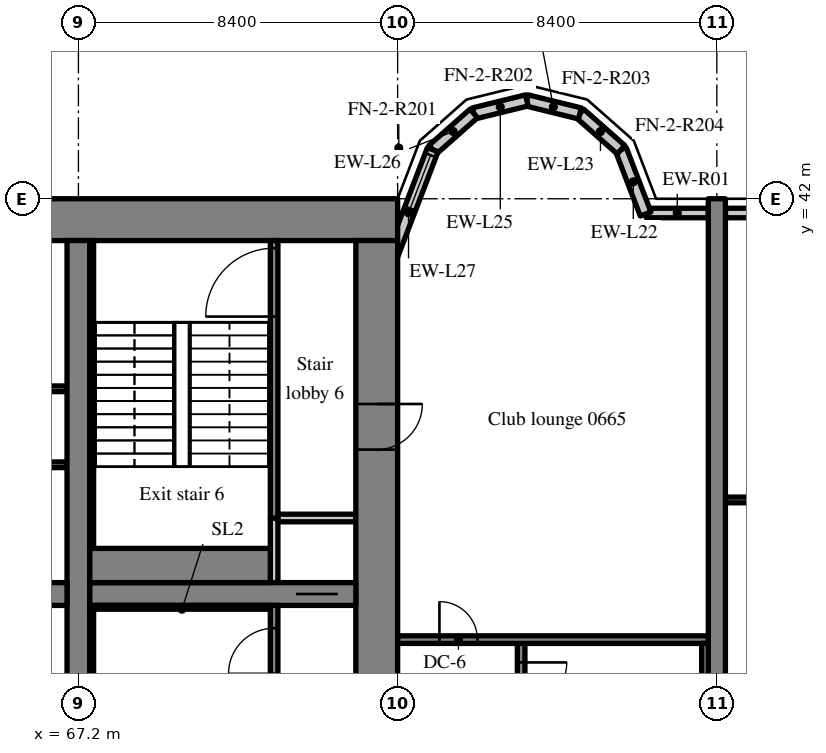
"""IFC4 building model, lengths in metres.
Left out: names, types, materials, properties, quantities, classifications, styles, units other than length and angle.
Written with IfcOpenShell. Run it as: python <this file> out.ifc"""

import sys

from ifc_helpers import new_model, si_unit, direction, frame, frame_2d, origin, place, context, subcontext, project, spatial, rectangle, extrude, source, transform, mapped, element, fill, save


model = new_model("IFC4")
c1 = context("Model", 3, precision=1e-05, world=origin(), true_north=direction((0.0, 1.0)))
c2 = subcontext(c1, "Body", "Model", "MODEL_VIEW")
j1 = project(units=[si_unit("LENGTHUNIT", "METRE"), si_unit("PLANEANGLEUNIT", "RADIAN")], contexts=[c1])
p1 = place(None, origin())
s1 = spatial("IfcSite", under=j1, at=p1, CompositionType="ELEMENT")
p2 = place(p1, origin())
s2 = spatial("IfcBuilding", under=s1, at=p2, CompositionType="ELEMENT")
p3 = place(p2, frame((0.0, 0.0, 31.6)))
s3 = spatial("IfcBuildingStorey", under=s2, at=p3, CompositionType="ELEMENT", Elevation=31.6)
m1 = source(origin(), c2, "Body", "SweptSolid", [
    extrude(rectangle(XDim=50.4, YDim=1.1, at=frame_2d((25.2, 0.0))), origin(), (0.0, 0.0, 1.0), 3.52),
])
p4 = place(p3, frame((25.2, 41.45, 0.0), z_axis=(0.0, 0.0, 1.0), x_axis=(1.0, 0.0, 0.0)))
e1 = element("IfcWall", 1, at=p4, inside=s3, PredefinedType="SHEAR", context=c2, shape_type="MappedRepresentation", body=[
    mapped(m1, transform((0.0, 0.0, 0.0), scale=1.0)),
])
m2 = source(origin(), c2, "Body", "SweptSolid", [
    extrude(rectangle(XDim=17.8, YDim=1.1, at=frame_2d((8.9, 0.0))), origin(), (0.0, 0.0, 1.0), 3.52),
])
p5 = place(p3, frame((75.05, 23.1, 0.0), z_axis=(0.0, 0.0, 1.0), x_axis=(0.0, 1.0, 0.0)))
e2 = element("IfcWall", 2, at=p5, inside=s3, PredefinedType="SHEAR", context=c2, shape_type="MappedRepresentation", body=[
    mapped(m2, transform((0.0, 0.0, 0.0), scale=1.0)),
])
m3 = source(origin(), c2, "Body", "SweptSolid", [
    extrude(rectangle(XDim=1.2, YDim=2.1, at=frame_2d((0.6, 1.05))), frame((0.0, 0.56, 0.0), z_axis=(0.0, -1.0, 0.0), x_axis=(1.0, 0.0, 0.0)), (0.0, 0.0, 1.0), 1.12),
])
p6 = place(p5, frame((12.3, 0.0, 0.0)))
e3 = element("IfcOpeningElement", 3, at=p6, cuts=e2, PredefinedType="OPENING", context=c2, shape_type="MappedRepresentation", body=[
    mapped(m3, transform((0.0, 0.0, 0.0), scale=1.0)),
])
m4 = source(origin(), c2, "Body", "SweptSolid", [
    extrude(rectangle(XDim=17.8, YDim=0.6, at=frame_2d((8.9, 0.0))), origin(), (0.0, 0.0, 1.0), 3.52),
])
p7 = place(p3, frame((67.2, 23.1, 0.0), z_axis=(0.0, 0.0, 1.0), x_axis=(0.0, 1.0, 0.0)))
e4 = element("IfcWall", 4, at=p7, inside=s3, PredefinedType="SHEAR", context=c2, shape_type="MappedRepresentation", body=[
    mapped(m4, transform((0.0, 0.0, 0.0), scale=1.0)),
])
m5 = source(origin(), c2, "Body", "SweptSolid", [
    extrude(rectangle(XDim=16.2, YDim=0.6, at=frame_2d((8.1, 0.0))), origin(), (0.0, 0.0, 1.0), 3.52),
])
p8 = place(p3, frame((50.7, 31.6, 0.0), z_axis=(0.0, 0.0, 1.0), x_axis=(1.0, 0.0, 0.0)))
e5 = element("IfcWall", 5, at=p8, inside=s3, PredefinedType="SHEAR", context=c2, shape_type="MappedRepresentation", body=[
    mapped(m5, transform((0.0, 0.0, 0.0), scale=1.0)),
])
m6 = source(origin(), c2, "Body", "SweptSolid", [
    extrude(rectangle(XDim=1.0, YDim=2.1, at=frame_2d((0.5, 1.05))), frame((0.0, 0.31, 0.0), z_axis=(0.0, -1.0, 0.0), x_axis=(1.0, 0.0, 0.0)), (0.0, 0.0, 1.0), 0.62),
])
p9 = place(p8, frame((0.55, 0.0, 0.0)))
e6 = element("IfcOpeningElement", 6, at=p9, cuts=e5, PredefinedType="OPENING", context=c2, shape_type="MappedRepresentation", body=[
    mapped(m6, transform((0.0, 0.0, 0.0), scale=1.0)),
])
m7 = source(origin(), c2, "Body", "SweptSolid", [
    extrude(rectangle(XDim=7.0, YDim=0.6, at=frame_2d((3.5, 0.0))), origin(), (0.0, 0.0, 1.0), 3.52),
])
p10 = place(p3, frame((67.5, 31.6, 0.0), z_axis=(0.0, 0.0, 1.0), x_axis=(1.0, 0.0, 0.0)))
e7 = element("IfcWall", 7, at=p10, inside=s3, PredefinedType="SHEAR", context=c2, shape_type="MappedRepresentation", body=[
    mapped(m7, transform((0.0, 0.0, 0.0), scale=1.0)),
])
m8 = source(origin(), c2, "Body", "SweptSolid", [
    extrude(rectangle(XDim=1.1, YDim=2.1, at=frame_2d((0.55, 1.05))), frame((0.0, 0.31, 0.0), z_axis=(0.0, -1.0, 0.0), x_axis=(1.0, 0.0, 0.0)), (0.0, 0.0, 1.0), 0.62),
])
p11 = place(p10, frame((5.425, 0.0, 0.0)))
e8 = element("IfcOpeningElement", 8, at=p11, cuts=e7, PredefinedType="OPENING", context=c2, shape_type="MappedRepresentation", body=[
    mapped(m8, transform((0.0, 0.0, 0.0), scale=1.0)),
])
m9 = source(origin(), c2, "Body", "SweptSolid", [
    extrude(rectangle(XDim=20.0, YDim=0.45, at=frame_2d((10.0, 0.0))), origin(), (0.0, 0.0, 1.0), 3.52),
])
p12 = place(p3, frame((84.0, 22.0, 0.0), z_axis=(0.0, 0.0, 1.0), x_axis=(0.0, 1.0, 0.0)))
e9 = element("IfcWall", 9, at=p12, inside=s3, PredefinedType="SHEAR", context=c2, shape_type="MappedRepresentation", body=[
    mapped(m9, transform((0.0, 0.0, 0.0), scale=1.0)),
])
m10 = source(origin(), c2, "Body", "SweptSolid", [
    extrude(rectangle(XDim=1.633, YDim=0.25, at=frame_2d((0.816, 0.0))), origin(), (0.0, 0.0, 1.0), 2.77),
])
p13 = place(p3, frame((83.775, 41.625, 0.0), z_axis=(0.0, 0.0, 1.0), x_axis=(-1.0, 0.0, 0.0)))
e10 = element("IfcWall", 10, at=p13, inside=s3, PredefinedType="SOLIDWALL", context=c2, shape_type="MappedRepresentation", body=[
    mapped(m10, transform((0.0, 0.0, 0.0), scale=1.0)),
])
m11 = source(origin(), c2, "Body", "SweptSolid", [
    extrude(rectangle(XDim=3.525, YDim=0.25, at=frame_2d((1.762, 0.0))), origin(), (0.0, 0.0, 1.0), 2.77),
])
p14 = place(p3, frame((87.75, 41.625, 0.0), z_axis=(0.0, 0.0, 1.0), x_axis=(-1.0, 0.0, 0.0)))
e11 = element("IfcWall", 11, at=p14, inside=s3, PredefinedType="SOLIDWALL", context=c2, shape_type="MappedRepresentation", body=[
    mapped(m11, transform((0.0, 0.0, 0.0), scale=1.0)),
])
m12 = source(origin(), c2, "Body", "SweptSolid", [
    extrude(rectangle(XDim=1.5, YDim=1.5, at=frame_2d((0.75, 0.75))), frame((0.0, 0.135, 0.0), z_axis=(0.0, -1.0, 0.0), x_axis=(1.0, 0.0, 0.0)), (0.0, 0.0, 1.0), 0.27),
])
p15 = place(p14, frame((1.012, 0.0, 0.9)))
e12 = element("IfcOpeningElement", 12, at=p15, cuts=e11, PredefinedType="OPENING", context=c2, shape_type="MappedRepresentation", body=[
    mapped(m12, transform((0.0, 0.0, 0.0), scale=1.0)),
])
m13 = source(origin(), c2, "Body", "SweptSolid", [
    extrude(rectangle(XDim=1.812, YDim=0.3, at=frame_2d((0.906, 0.0))), origin(), (0.0, 0.0, 1.0), 3.52),
])
p16 = place(p3, frame((82.125, 41.6, 0.0), z_axis=(0.0, 0.0, 1.0), x_axis=(-0.357877270961, 0.93376863244, 0.0)))
e13 = element("IfcWall", 13, at=p16, inside=s3, PredefinedType="SOLIDWALL", context=c2, shape_type="MappedRepresentation", body=[
    mapped(m13, transform((0.0, 0.0, 0.0), scale=1.0)),
])
m14 = source(origin(), c2, "Body", "SweptSolid", [
    extrude(rectangle(XDim=1.44, YDim=0.3, at=frame_2d((0.72, 0.0))), origin(), (0.0, 0.0, 1.0), 3.52),
])
p17 = place(p3, frame((81.477, 43.292, 0.0), z_axis=(0.0, 0.0, 1.0), x_axis=(-0.74957555648, 0.661918790432, 0.0)))
e14 = element("IfcWall", 14, at=p17, inside=s3, PredefinedType="SOLIDWALL", context=c2, shape_type="MappedRepresentation", body=[
    mapped(m14, transform((0.0, 0.0, 0.0), scale=1.0)),
])
m15 = source(origin(), c2, "Body", "SweptSolid", [
    extrude(rectangle(XDim=1.439, YDim=0.3, at=frame_2d((0.719, 0.0))), origin(), (0.0, 0.0, 1.0), 3.52),
])
for number, where, z_axis, x_axis in (
    (15, (80.397, 44.245, 0.0), (0.0, 0.0, 1.0), (-0.971, 0.238, 0.0)),
    (16, (79.0, 44.588, 0.0), (0.0, 0.0, 1.0), (-0.971, -0.238, 0.0)),
):
    element("IfcWall", number, at=place(p3, frame(where, z_axis=z_axis, x_axis=x_axis)), inside=s3, PredefinedType="SOLIDWALL", context=c2, shape_type="MappedRepresentation", body=[
        mapped(m15, transform((0.0, 0.0, 0.0), scale=1.0)),
    ])
p18 = place(p3, frame((77.603, 44.245, 0.0), z_axis=(0.0, 0.0, 1.0), x_axis=(-0.74957555648, -0.661918790432, 0.0)))
e17 = element("IfcWall", 17, at=p18, inside=s3, PredefinedType="SOLIDWALL", context=c2, shape_type="MappedRepresentation", body=[
    mapped(m14, transform((0.0, 0.0, 0.0), scale=1.0)),
])
m16 = source(origin(), c2, "Body", "SweptSolid", [
    extrude(rectangle(XDim=3.559, YDim=0.3, at=frame_2d((1.78, 0.0))), origin(), (0.0, 0.0, 1.0), 3.52),
])
p19 = place(p3, frame((76.523, 43.292, 0.0), z_axis=(0.0, 0.0, 1.0), x_axis=(-0.35779745313, -0.933799219604, 0.0)))
e18 = element("IfcWall", 18, at=p19, inside=s3, PredefinedType="SOLIDWALL", context=c2, shape_type="MappedRepresentation", body=[
    mapped(m16, transform((0.0, 0.0, 0.0), scale=1.0)),
])
m17 = source(origin(), c2, "Body", "SweptSolid", [
    extrude(rectangle(XDim=1.5, YDim=2.0, at=frame_2d((0.75, 1.0))), frame((0.0, 0.16, 0.0), z_axis=(0.0, -1.0, 0.0), x_axis=(1.0, 0.0, 0.0)), (0.0, 0.0, 1.0), 0.32),
])
p20 = place(p19, frame((0.156, 0.0, 0.9)))
e19 = element("IfcOpeningElement", 19, at=p20, cuts=e18, PredefinedType="OPENING", context=c2, shape_type="MappedRepresentation", body=[
    mapped(m17, transform((0.0, 0.0, 0.0), scale=1.0)),
])
m18 = source(origin(), c2, "Body", "SweptSolid", [
    extrude(rectangle(XDim=14.1, YDim=0.15, at=frame_2d((7.05, 0.0))), origin(), (0.0, 0.0, 1.0), 3.52),
])
p21 = place(p3, frame((66.9, 35.0, 0.0), z_axis=(0.0, 0.0, 1.0), x_axis=(-1.0, 0.0, 0.0)))
e20 = element("IfcWall", 20, at=p21, inside=s3, PredefinedType="PARTITIONING", context=c2, shape_type="MappedRepresentation", body=[
    mapped(m18, transform((0.0, 0.0, 0.0), scale=1.0)),
])
m19 = source(origin(), c2, "Body", "SweptSolid", [
    extrude(rectangle(XDim=0.9, YDim=2.1, at=frame_2d((0.45, 1.05))), frame((0.0, 0.085, 0.0), z_axis=(0.0, -1.0, 0.0), x_axis=(1.0, 0.0, 0.0)), (0.0, 0.0, 1.0), 0.17),
])
p22 = place(p21, frame((6.562, 0.0, 0.0)))
e21 = element("IfcOpeningElement", 21, at=p22, cuts=e20, PredefinedType="OPENING", context=c2, shape_type="MappedRepresentation", body=[
    mapped(m19, transform((0.0, 0.0, 0.0), scale=1.0)),
])
m20 = source(origin(), c2, "Body", "SweptSolid", [
    extrude(rectangle(XDim=16.2, YDim=0.15, at=frame_2d((8.1, 0.0))), origin(), (0.0, 0.0, 1.0), 3.52),
])
p23 = place(p3, frame((66.9, 37.0, 0.0), z_axis=(0.0, 0.0, 1.0), x_axis=(-1.0, 0.0, 0.0)))
e22 = element("IfcWall", 22, at=p23, inside=s3, PredefinedType="PARTITIONING", context=c2, shape_type="MappedRepresentation", body=[
    mapped(m20, transform((0.0, 0.0, 0.0), scale=1.0)),
])
p24 = place(p23, frame((3.195, 0.0, 0.0)))
e23 = element("IfcOpeningElement", 23, at=p24, cuts=e22, PredefinedType="OPENING", context=c2, shape_type="MappedRepresentation", body=[
    mapped(m19, transform((0.0, 0.0, 0.0), scale=1.0)),
])
p25 = place(p23, frame((8.055, 0.0, 0.0)))
e24 = element("IfcOpeningElement", 24, at=p25, cuts=e22, PredefinedType="OPENING", context=c2, shape_type="MappedRepresentation", body=[
    mapped(m19, transform((0.0, 0.0, 0.0), scale=1.0)),
])
p26 = place(p23, frame((11.295, 0.0, 0.0)))
e25 = element("IfcOpeningElement", 25, at=p26, cuts=e22, PredefinedType="OPENING", context=c2, shape_type="MappedRepresentation", body=[
    mapped(m19, transform((0.0, 0.0, 0.0), scale=1.0)),
])
p27 = place(p23, frame((14.535, 0.0, 0.0)))
e26 = element("IfcOpeningElement", 26, at=p27, cuts=e22, PredefinedType="OPENING", context=c2, shape_type="MappedRepresentation", body=[
    mapped(m19, transform((0.0, 0.0, 0.0), scale=1.0)),
])
m21 = source(origin(), c2, "Body", "SweptSolid", [
    extrude(rectangle(XDim=8.2, YDim=0.2, at=frame_2d((4.1, 0.0))), origin(), (0.0, 0.0, 1.0), 3.52),
])
p28 = place(p3, frame((72.35, 23.1, 0.0), z_axis=(0.0, 0.0, 1.0), x_axis=(0.0, 1.0, 0.0)))
e27 = element("IfcWall", 27, at=p28, inside=s3, PredefinedType="SOLIDWALL", context=c2, shape_type="MappedRepresentation", body=[
    mapped(m21, transform((0.0, 0.0, 0.0), scale=1.0)),
])
m22 = source(origin(), c2, "Body", "SweptSolid", [
    extrude(rectangle(XDim=1.2, YDim=2.1, at=frame_2d((0.6, 1.05))), frame((0.0, 0.11, 0.0), z_axis=(0.0, -1.0, 0.0), x_axis=(1.0, 0.0, 0.0)), (0.0, 0.0, 1.0), 0.22),
])
p29 = place(p28, frame((6.4, 0.0, 0.0)))
e28 = element("IfcOpeningElement", 28, at=p29, cuts=e27, PredefinedType="OPENING", context=c2, shape_type="MappedRepresentation", body=[
    mapped(m22, transform((0.0, 0.0, 0.0), scale=1.0)),
])
m23 = source(origin(), c2, "Body", "SweptSolid", [
    extrude(rectangle(XDim=1.7, YDim=0.2, at=frame_2d((0.85, 0.0))), origin(), (0.0, 0.0, 1.0), 3.52),
])
p30 = place(p3, frame((72.35, 31.9, 0.0), z_axis=(0.0, 0.0, 1.0), x_axis=(0.0, 1.0, 0.0)))
e29 = element("IfcWall", 29, at=p30, inside=s3, PredefinedType="SOLIDWALL", context=c2, shape_type="MappedRepresentation", body=[
    mapped(m23, transform((0.0, 0.0, 0.0), scale=1.0)),
])
m24 = source(origin(), c2, "Body", "SweptSolid", [
    extrude(rectangle(XDim=2.05, YDim=0.2, at=frame_2d((1.025, 0.0))), origin(), (0.0, 0.0, 1.0), 3.52),
])
p31 = place(p3, frame((72.45, 33.6, 0.0), z_axis=(0.0, 0.0, 1.0), x_axis=(1.0, 0.0, 0.0)))
e30 = element("IfcWall", 30, at=p31, inside=s3, PredefinedType="SOLIDWALL", context=c2, shape_type="MappedRepresentation", body=[
    mapped(m24, transform((0.0, 0.0, 0.0), scale=1.0)),
])
m25 = source(origin(), c2, "Body", "SweptSolid", [
    extrude(rectangle(XDim=7.3, YDim=0.2, at=frame_2d((3.65, 0.0))), origin(), (0.0, 0.0, 1.0), 3.52),
])
p32 = place(p3, frame((72.35, 33.6, 0.0), z_axis=(0.0, 0.0, 1.0), x_axis=(0.0, 1.0, 0.0)))
e31 = element("IfcWall", 31, at=p32, inside=s3, PredefinedType="SOLIDWALL", context=c2, shape_type="MappedRepresentation", body=[
    mapped(m25, transform((0.0, 0.0, 0.0), scale=1.0)),
])
m26 = source(origin(), c2, "Body", "SweptSolid", [
    extrude(rectangle(XDim=1.8, YDim=2.1, at=frame_2d((0.9, 1.05))), frame((0.0, 0.11, 0.0), z_axis=(0.0, -1.0, 0.0), x_axis=(1.0, 0.0, 0.0)), (0.0, 0.0, 1.0), 0.22),
])
p33 = place(p32, frame((5.3, 0.0, 0.0)))
e32 = element("IfcOpeningElement", 32, at=p33, cuts=e31, PredefinedType="OPENING", context=c2, shape_type="MappedRepresentation", body=[
    mapped(m26, transform((0.0, 0.0, 0.0), scale=1.0)),
])
m27 = source(origin(), c2, "Body", "SweptSolid", [
    extrude(rectangle(XDim=8.3, YDim=0.2, at=frame_2d((4.15, 0.0))), origin(), (0.0, 0.0, 1.0), 3.52),
])
p34 = place(p3, frame((78.85, 22.1, 0.0), z_axis=(0.0, 0.0, 1.0), x_axis=(0.0, 1.0, 0.0)))
e33 = element("IfcWall", 33, at=p34, inside=s3, PredefinedType="SOLIDWALL", context=c2, shape_type="MappedRepresentation", body=[
    mapped(m27, transform((0.0, 0.0, 0.0), scale=1.0)),
])
p35 = place(p34, frame((6.5, 0.0, 0.0)))
e34 = element("IfcOpeningElement", 34, at=p35, cuts=e33, PredefinedType="OPENING", context=c2, shape_type="MappedRepresentation", body=[
    mapped(m22, transform((0.0, 0.0, 0.0), scale=1.0)),
])
m28 = source(origin(), c2, "Body", "SweptSolid", [
    extrude(rectangle(XDim=8.175, YDim=0.2, at=frame_2d((4.087, 0.0))), origin(), (0.0, 0.0, 1.0), 3.52),
])
p36 = place(p3, frame((83.775, 30.4, 0.0), z_axis=(0.0, 0.0, 1.0), x_axis=(-1.0, 0.0, 0.0)))
e35 = element("IfcWall", 35, at=p36, inside=s3, PredefinedType="SOLIDWALL", context=c2, shape_type="MappedRepresentation", body=[
    mapped(m28, transform((0.0, 0.0, 0.0), scale=1.0)),
])
m29 = source(origin(), c2, "Body", "SweptSolid", [
    extrude(rectangle(XDim=1.0, YDim=2.1, at=frame_2d((0.5, 1.05))), frame((0.0, 0.11, 0.0), z_axis=(0.0, -1.0, 0.0), x_axis=(1.0, 0.0, 0.0)), (0.0, 0.0, 1.0), 0.22),
])
p37 = place(p36, frame((6.075, 0.0, 0.0)))
e36 = element("IfcOpeningElement", 36, at=p37, cuts=e35, PredefinedType="OPENING", context=c2, shape_type="MappedRepresentation", body=[
    mapped(m29, transform((0.0, 0.0, 0.0), scale=1.0)),
])
m30 = source(origin(), c2, "Body", "SweptSolid", [
    extrude(rectangle(XDim=4.75, YDim=0.1, at=frame_2d((2.375, 0.0))), origin(), (0.0, 0.0, 1.0), 3.52),
])
p38 = place(p3, frame((67.5, 31.25, 0.0), z_axis=(0.0, 0.0, 1.0), x_axis=(1.0, 0.0, 0.0)))
e37 = element("IfcWall", 37, at=p38, inside=s3, PredefinedType="SOLIDWALL", context=c2, shape_type="MappedRepresentation", body=[
    mapped(m30, transform((0.0, 0.0, 0.0), scale=1.0)),
])
m31 = source(origin(), c2, "Body", "SweptSolid", [
    extrude(rectangle(XDim=8.1, YDim=0.1, at=frame_2d((4.05, 0.0))), origin(), (0.0, 0.0, 1.0), 3.52),
])
p39 = place(p3, frame((67.55, 23.1, 0.0), z_axis=(0.0, 0.0, 1.0), x_axis=(0.0, 1.0, 0.0)))
e38 = element("IfcWall", 38, at=p39, inside=s3, PredefinedType="SOLIDWALL", context=c2, shape_type="MappedRepresentation", body=[
    mapped(m31, transform((0.0, 0.0, 0.0), scale=1.0)),
])
m32 = source(origin(), c2, "Body", "SweptSolid", [
    extrude(rectangle(XDim=4.75, YDim=0.9, at=frame_2d((2.375, 0.0))), origin(), (0.0, 0.0, 1.0), 3.52),
])
p40 = place(p3, frame((67.5, 32.35, 0.0), z_axis=(0.0, 0.0, 1.0), x_axis=(1.0, 0.0, 0.0)))
e39 = element("IfcWall", 39, at=p40, inside=s3, PredefinedType="SOLIDWALL", context=c2, shape_type="MappedRepresentation", body=[
    mapped(m32, transform((0.0, 0.0, 0.0), scale=1.0)),
])
p41 = place(p3, frame((67.55, 32.8, 0.0), z_axis=(0.0, 0.0, 1.0), x_axis=(0.0, 1.0, 0.0)))
e40 = element("IfcWall", 40, at=p41, inside=s3, PredefinedType="SOLIDWALL", context=c2, shape_type="MappedRepresentation", body=[
    mapped(m31, transform((0.0, 0.0, 0.0), scale=1.0)),
])
m33 = source(origin(), c2, "Body", "SweptSolid", [
    extrude(rectangle(XDim=8.1, YDim=0.175, at=frame_2d((4.05, 0.0))), origin(), (0.0, 0.0, 1.0), 3.52),
])
p42 = place(p3, frame((83.688, 22.2, 0.0), z_axis=(0.0, 0.0, 1.0), x_axis=(0.0, 1.0, 0.0)))
e41 = element("IfcWall", 41, at=p42, inside=s3, PredefinedType="SOLIDWALL", context=c2, shape_type="MappedRepresentation", body=[
    mapped(m33, transform((0.0, 0.0, 0.0), scale=1.0)),
])
m34 = source(origin(), c2, "Body", "SweptSolid", [
    extrude(rectangle(XDim=7.95, YDim=0.15, at=frame_2d((3.975, 0.0))), origin(), (0.0, 0.0, 1.0), 3.52),
])
p43 = place(p3, frame((84.225, 34.075, 0.0), z_axis=(0.0, 0.0, 1.0), x_axis=(1.0, 0.0, 0.0)))
e42 = element("IfcWall", 42, at=p43, inside=s3, PredefinedType="PARTITIONING", context=c2, shape_type="MappedRepresentation", body=[
    mapped(m34, transform((0.0, 0.0, 0.0), scale=1.0)),
])
m35 = source(origin(), c2, "Body", "SweptSolid", [
    extrude(rectangle(XDim=1.0, YDim=2.1, at=frame_2d((0.5, 1.05))), frame((0.0, 0.085, 0.0), z_axis=(0.0, -1.0, 0.0), x_axis=(1.0, 0.0, 0.0)), (0.0, 0.0, 1.0), 0.17),
])
p44 = place(p43, frame((0.7, 0.0, 0.0)))
e43 = element("IfcOpeningElement", 43, at=p44, cuts=e42, PredefinedType="OPENING", context=c2, shape_type="MappedRepresentation", body=[
    mapped(m35, transform((0.0, 0.0, 0.0), scale=1.0)),
])
m36 = source(origin(), c2, "Body", "SweptSolid", [
    extrude(rectangle(XDim=1.5, YDim=2.0, at=frame_2d((0.75, 1.0))), frame((0.0, 0.03, 0.0), z_axis=(0.0, -1.0, 0.0), x_axis=(1.0, 0.0, 0.0)), (0.0, 0.0, 1.0), 0.06),
])
p45 = place(p20, origin())
e44 = element("IfcWindow", 44, at=p45, inside=s3, PartitioningType="SINGLE_PANEL", PredefinedType="WINDOW", context=c2, shape_type="MappedRepresentation", body=[
    mapped(m36, transform((0.0, 0.0, 0.0), scale=1.0)),
])
fill(e19, e44)
m37 = source(origin(), c2, "Body", "SweptSolid", [
    extrude(rectangle(XDim=1.2, YDim=2.1, at=frame_2d((0.6, 1.05))), frame((0.0, 0.025, 0.0), z_axis=(0.0, -1.0, 0.0), x_axis=(1.0, 0.0, 0.0)), (0.0, 0.0, 1.0), 0.05),
])
p46 = place(p29, origin())
e45 = element("IfcDoor", 45, at=p46, inside=s3, OperationType="SINGLE_SWING_LEFT", PredefinedType="DOOR", context=c2, shape_type="MappedRepresentation", body=[
    mapped(m37, transform((0.0, 0.0, 0.0), scale=1.0)),
])
fill(e28, e45)
m38 = source(origin(), c2, "Body", "SweptSolid", [
    extrude(rectangle(XDim=1.1, YDim=2.1, at=frame_2d((0.55, 1.05))), frame((0.0, 0.025, 0.0), z_axis=(0.0, -1.0, 0.0), x_axis=(1.0, 0.0, 0.0)), (0.0, 0.0, 1.0), 0.05),
])
p47 = place(p11, origin())
e46 = element("IfcDoor", 46, at=p47, inside=s3, OperationType="SLIDING_TO_RIGHT", PredefinedType="DOOR", context=c2, shape_type="MappedRepresentation", body=[
    mapped(m38, transform((0.0, 0.0, 0.0), scale=1.0)),
])
fill(e8, e46)
m39 = source(origin(), c2, "Body", "SweptSolid", [
    extrude(rectangle(XDim=1.8, YDim=2.1, at=frame_2d((0.9, 1.05))), frame((0.0, 0.025, 0.0), z_axis=(0.0, -1.0, 0.0), x_axis=(1.0, 0.0, 0.0)), (0.0, 0.0, 1.0), 0.05),
])
p48 = place(p33, origin())
e47 = element("IfcDoor", 47, at=p48, inside=s3, OperationType="SINGLE_SWING_LEFT", PredefinedType="DOOR", context=c2, shape_type="MappedRepresentation", body=[
    mapped(m39, transform((0.0, 0.0, 0.0), scale=1.0)),
])
fill(e32, e47)
p49 = place(p6, origin())
e48 = element("IfcDoor", 48, at=p49, inside=s3, OperationType="SINGLE_SWING_RIGHT", PredefinedType="DOOR", context=c2, shape_type="MappedRepresentation", body=[
    mapped(m37, transform((0.0, 0.0, 0.0), scale=1.0)),
])
fill(e3, e48)
p50 = place(p35, origin())
e49 = element("IfcDoor", 49, at=p50, inside=s3, OperationType="SINGLE_SWING_RIGHT", PredefinedType="DOOR", context=c2, shape_type="MappedRepresentation", body=[
    mapped(m37, transform((0.0, 0.0, 0.0), scale=1.0)),
])
fill(e34, e49)
m40 = source(origin(), c2, "Body", "SweptSolid", [
    extrude(rectangle(XDim=1.0, YDim=2.1, at=frame_2d((0.5, 1.05))), frame((0.0, 0.025, 0.0), z_axis=(0.0, -1.0, 0.0), x_axis=(1.0, 0.0, 0.0)), (0.0, 0.0, 1.0), 0.05),
])
p51 = place(p37, origin())
e50 = element("IfcDoor", 50, at=p51, inside=s3, OperationType="SINGLE_SWING_RIGHT", PredefinedType="DOOR", context=c2, shape_type="MappedRepresentation", body=[
    mapped(m40, transform((0.0, 0.0, 0.0), scale=1.0)),
])
fill(e36, e50)
save(model, sys.argv[1])
